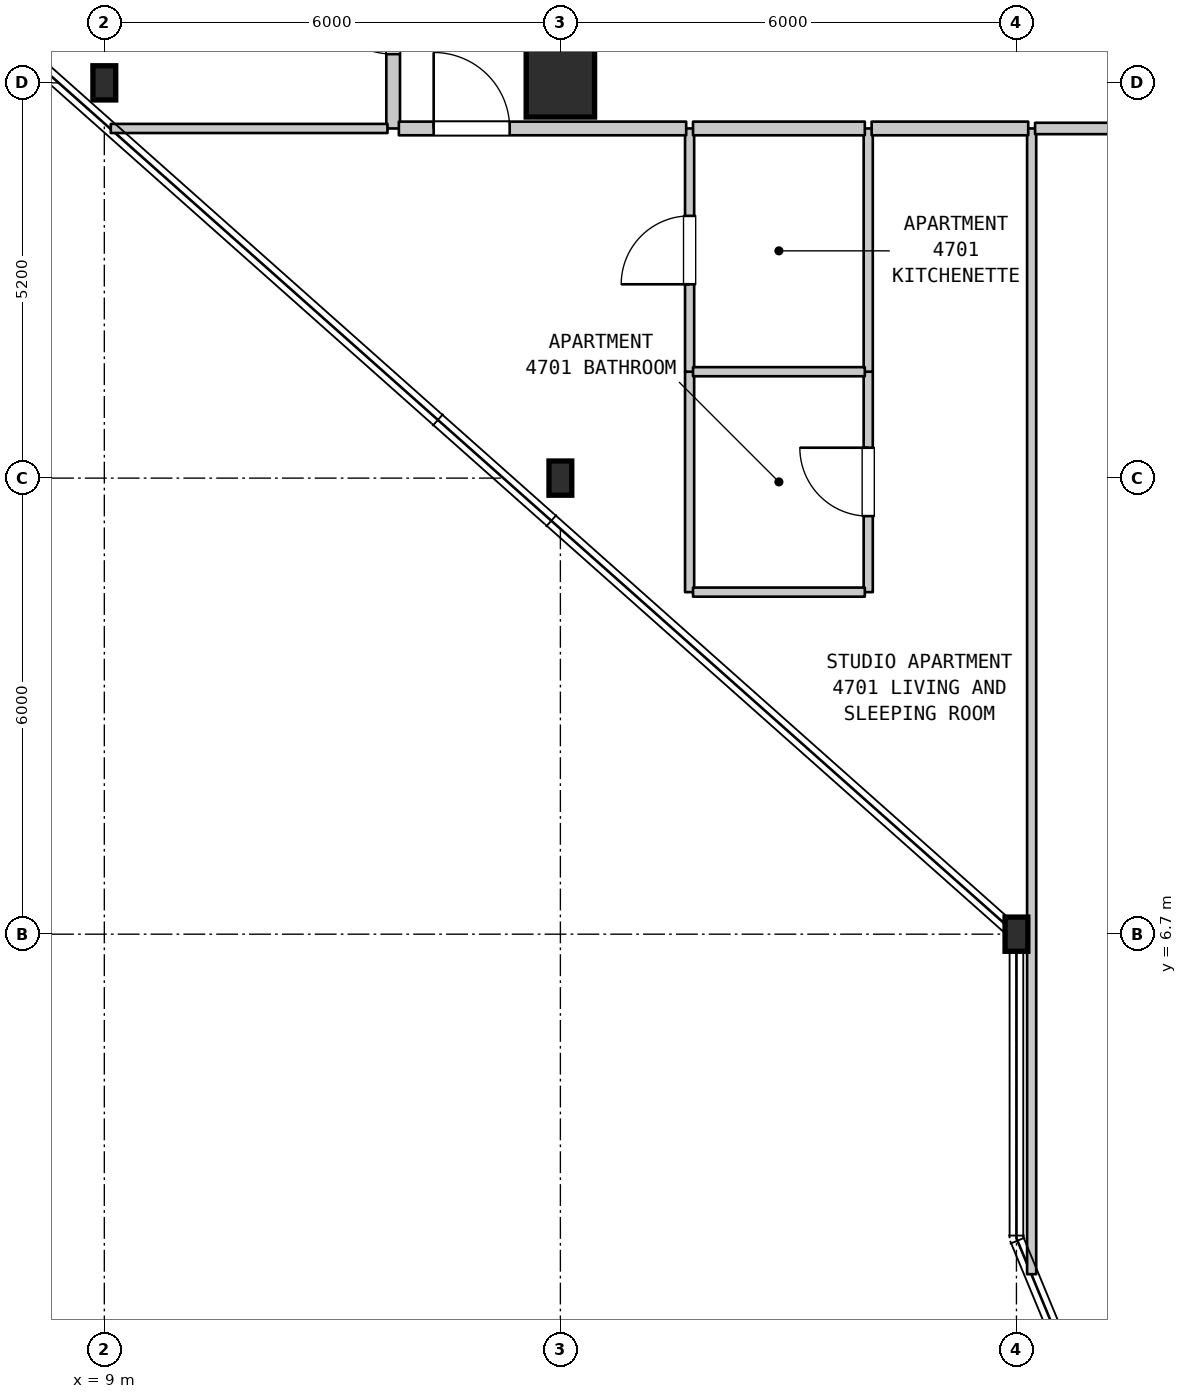
"""IFC4 building model, lengths in metres.
Left out: names, types, materials, properties, quantities, classifications, styles, units other than length and angle.
Written with IfcOpenShell. Run it as: python <this file> out.ifc"""

import sys

from ifc_helpers import new_model, si_unit, direction, frame, frame_2d, origin, origin_2d, place, context, subcontext, project, spatial, rectangle, i_section, extrude, element, fill, save


model = new_model("IFC4")
c1 = context("Model", 3, precision=1e-05, world=origin(), true_north=direction((0.0, 1.0)))
c2 = subcontext(c1, "Body", "Model", "MODEL_VIEW")
j1 = project(units=[si_unit("LENGTHUNIT", "METRE"), si_unit("PLANEANGLEUNIT", "RADIAN")], contexts=[c1])
p1 = place(None, origin())
s1 = spatial("IfcSite", under=j1, at=p1, CompositionType="ELEMENT")
p2 = place(p1, origin())
s2 = spatial("IfcBuilding", under=s1, at=p2, CompositionType="ELEMENT")
p3 = place(p2, frame((0.0, 0.0, 192.1)))
s3 = spatial("IfcBuildingStorey", under=s2, at=p3, CompositionType="ELEMENT", Elevation=192.1)
for number, where, z_axis, x_axis in (
    (1, (9.0, 17.9, 0.0), (0.0, 0.0, 1.0), (1.0, 0.0, 0.0)),
    (2, (15.0, 12.7, 0.0), (0.0, 0.0, 1.0), (1.0, 0.0, 0.0)),
):
    element("IfcColumn", number, at=place(p3, frame(where, z_axis=z_axis, x_axis=x_axis)), inside=s3, PredefinedType="COLUMN", context=c2, shape_type="SweptSolid", body=[
        extrude(i_section(OverallWidth=0.3, OverallDepth=0.45, WebThickness=0.014, FlangeThickness=0.026, FilletRadius=0.027, at=origin_2d()), origin(), (0.0, 0.0, 1.0), 3.7),
    ])
p4 = place(p3, frame((15.0, 17.9, 0.0), z_axis=(0.0, 0.0, 1.0), x_axis=(1.0, 0.0, 0.0)))
e3 = element("IfcColumn", 3, at=p4, inside=s3, PredefinedType="COLUMN", context=c2, shape_type="SweptSolid", body=[
    extrude(rectangle(XDim=0.9, YDim=0.9, at=origin_2d()), origin(), (0.0, 0.0, 1.0), 3.7),
])
p5 = place(p3, frame((21.0, 6.7, 0.0), z_axis=(0.0, 0.0, 1.0), x_axis=(1.0, 0.0, 0.0)))
e4 = element("IfcColumn", 4, at=p5, inside=s3, PredefinedType="COLUMN", context=c2, shape_type="SweptSolid", body=[
    extrude(i_section(OverallWidth=0.3, OverallDepth=0.45, WebThickness=0.014, FlangeThickness=0.026, FilletRadius=0.027, at=origin_2d()), origin(), (0.0, 0.0, 1.0), 3.7),
])
p6 = place(p3, frame((12.8, 17.3, 0.0), z_axis=(0.0, 0.0, 1.0), x_axis=(0.0, 1.0, 0.0)))
e5 = element("IfcWall", 5, at=p6, inside=s3, PredefinedType="STANDARD", context=c2, shape_type="SweptSolid", body=[
    extrude(rectangle(XDim=3.1, YDim=0.18, at=frame_2d((1.55, 0.0))), origin(), (0.0, 0.0, 1.0), 3.39),
])
p7 = place(p6, frame((0.978, 0.0, 0.0)))
e6 = element("IfcOpeningElement", 6, at=p7, cuts=e5, PredefinedType="OPENING", context=c2, shape_type="SweptSolid", body=[
    extrude(rectangle(XDim=1.0, YDim=2.15, at=frame_2d((0.5, 1.075))), frame((0.0, 0.1, 0.0), z_axis=(0.0, -1.0, 0.0), x_axis=(1.0, 0.0, 0.0)), (0.0, 0.0, 1.0), 0.2),
])
p8 = place(p3, frame((16.7, 11.2, 0.0), z_axis=(0.0, 0.0, 1.0), x_axis=(0.0, 1.0, 0.0)))
e7 = element("IfcWall", 7, at=p8, inside=s3, PredefinedType="PARTITIONING", context=c2, shape_type="SweptSolid", body=[
    extrude(rectangle(XDim=2.9, YDim=0.12, at=frame_2d((1.45, 0.0))), origin(), (0.0, 0.0, 1.0), 3.39),
])
p9 = place(p3, frame((16.7, 14.1, 0.0), z_axis=(0.0, 0.0, 1.0), x_axis=(0.0, 1.0, 0.0)))
e8 = element("IfcWall", 8, at=p9, inside=s3, PredefinedType="PARTITIONING", context=c2, shape_type="SweptSolid", body=[
    extrude(rectangle(XDim=3.2, YDim=0.12, at=frame_2d((1.6, 0.0))), origin(), (0.0, 0.0, 1.0), 3.39),
])
p10 = place(p9, frame((1.15, 0.0, 0.0)))
e9 = element("IfcOpeningElement", 9, at=p10, cuts=e8, PredefinedType="OPENING", context=c2, shape_type="SweptSolid", body=[
    extrude(rectangle(XDim=0.9, YDim=2.15, at=frame_2d((0.45, 1.075))), frame((0.0, 0.07, 0.0), z_axis=(0.0, -1.0, 0.0), x_axis=(1.0, 0.0, 0.0)), (0.0, 0.0, 1.0), 0.14),
])
p11 = place(p3, frame((19.05, 11.2, 0.0), z_axis=(0.0, 0.0, 1.0), x_axis=(0.0, 1.0, 0.0)))
e10 = element("IfcWall", 10, at=p11, inside=s3, PredefinedType="PARTITIONING", context=c2, shape_type="SweptSolid", body=[
    extrude(rectangle(XDim=2.9, YDim=0.12, at=frame_2d((1.45, 0.0))), origin(), (0.0, 0.0, 1.0), 3.39),
])
p12 = place(p11, frame((1.0, 0.0, 0.0)))
e11 = element("IfcOpeningElement", 11, at=p12, cuts=e10, PredefinedType="OPENING", context=c2, shape_type="SweptSolid", body=[
    extrude(rectangle(XDim=0.9, YDim=2.1, at=frame_2d((0.45, 1.05))), frame((0.0, 0.07, 0.0), z_axis=(0.0, -1.0, 0.0), x_axis=(1.0, 0.0, 0.0)), (0.0, 0.0, 1.0), 0.14),
])
p13 = place(p3, frame((19.05, 14.1, 0.0), z_axis=(0.0, 0.0, 1.0), x_axis=(0.0, 1.0, 0.0)))
e12 = element("IfcWall", 12, at=p13, inside=s3, PredefinedType="PARTITIONING", context=c2, shape_type="SweptSolid", body=[
    extrude(rectangle(XDim=3.2, YDim=0.12, at=frame_2d((1.6, 0.0))), origin(), (0.0, 0.0, 1.0), 3.39),
])
p14 = place(p3, frame((21.2, 2.227, 0.0), z_axis=(0.0, 0.0, 1.0), x_axis=(0.0, 1.0, 0.0)))
e13 = element("IfcWall", 13, at=p14, inside=s3, PredefinedType="PARTITIONING", context=c2, shape_type="SweptSolid", body=[
    extrude(rectangle(XDim=15.073, YDim=0.12, at=frame_2d((7.537, 0.0))), origin(), (0.0, 0.0, 1.0), 3.39),
])
for number, where, z_axis, x_axis in (
    (14, (16.745, 11.2, 0.0), (0.0, 0.0, 1.0), (1.0, 0.0, 0.0)),
    (15, (16.745, 14.1, 0.0), (0.0, 0.0, 1.0), (1.0, 0.0, 0.0)),
):
    element("IfcWall", number, at=place(p3, frame(where, z_axis=z_axis, x_axis=x_axis)), inside=s3, PredefinedType="PARTITIONING", context=c2, shape_type="SweptSolid", body=[
        extrude(rectangle(XDim=2.26, YDim=0.12, at=frame_2d((1.13, 0.0))), origin(), (0.0, 0.0, 1.0), 3.39),
    ])
p15 = place(p3, frame((9.085, 17.3, 0.0), z_axis=(0.0, 0.0, 1.0), x_axis=(1.0, 0.0, 0.0)))
e16 = element("IfcWall", 16, at=p15, inside=s3, PredefinedType="PARTITIONING", context=c2, shape_type="SweptSolid", body=[
    extrude(rectangle(XDim=3.64, YDim=0.12, at=frame_2d((1.82, 0.0))), origin(), (0.0, 0.0, 1.0), 3.39),
])
p16 = place(p3, frame((12.875, 17.3, 0.0), z_axis=(0.0, 0.0, 1.0), x_axis=(1.0, 0.0, 0.0)))
e17 = element("IfcWall", 17, at=p16, inside=s3, PredefinedType="STANDARD", context=c2, shape_type="SweptSolid", body=[
    extrude(rectangle(XDim=3.78, YDim=0.18, at=frame_2d((1.89, 0.0))), origin(), (0.0, 0.0, 1.0), 3.39),
])
p17 = place(p16, frame((0.458, 0.0, 0.0)))
e18 = element("IfcOpeningElement", 18, at=p17, cuts=e17, PredefinedType="OPENING", context=c2, shape_type="SweptSolid", body=[
    extrude(rectangle(XDim=1.0, YDim=2.15, at=frame_2d((0.5, 1.075))), frame((0.0, 0.1, 0.0), z_axis=(0.0, -1.0, 0.0), x_axis=(1.0, 0.0, 0.0)), (0.0, 0.0, 1.0), 0.2),
])
p18 = place(p3, frame((16.745, 17.3, 0.0), z_axis=(0.0, 0.0, 1.0), x_axis=(1.0, 0.0, 0.0)))
e19 = element("IfcWall", 19, at=p18, inside=s3, PredefinedType="STANDARD", context=c2, shape_type="SweptSolid", body=[
    extrude(rectangle(XDim=2.26, YDim=0.18, at=frame_2d((1.13, 0.0))), origin(), (0.0, 0.0, 1.0), 3.39),
])
p19 = place(p3, frame((19.095, 17.3, 0.0), z_axis=(0.0, 0.0, 1.0), x_axis=(1.0, 0.0, 0.0)))
e20 = element("IfcWall", 20, at=p19, inside=s3, PredefinedType="STANDARD", context=c2, shape_type="SweptSolid", body=[
    extrude(rectangle(XDim=2.06, YDim=0.18, at=frame_2d((1.03, 0.0))), origin(), (0.0, 0.0, 1.0), 3.39),
])
p20 = place(p3, frame((21.245, 17.3, 0.0), z_axis=(0.0, 0.0, 1.0), x_axis=(1.0, 0.0, 0.0)))
e21 = element("IfcWall", 21, at=p20, inside=s3, PredefinedType="STANDARD", context=c2, shape_type="SweptSolid", body=[
    extrude(rectangle(XDim=4.91, YDim=0.15, at=frame_2d((2.455, 0.0))), origin(), (0.0, 0.0, 1.0), 3.39),
])
p21 = place(p20, frame((1.884, 0.0, 0.0)))
e22 = element("IfcOpeningElement", 22, at=p21, cuts=e21, PredefinedType="OPENING", context=c2, shape_type="SweptSolid", body=[
    extrude(rectangle(XDim=1.0, YDim=2.15, at=frame_2d((0.5, 1.075))), frame((0.0, 0.085, 0.0), z_axis=(0.0, -1.0, 0.0), x_axis=(1.0, 0.0, 0.0)), (0.0, 0.0, 1.0), 0.17),
])
p22 = place(p7, origin())
e23 = element("IfcDoor", 23, at=p22, inside=s3, OperationType="SINGLE_SWING_RIGHT", PredefinedType="DOOR", context=c2, shape_type="SweptSolid", body=[
    extrude(rectangle(XDim=1.0, YDim=2.15, at=frame_2d((0.5, 1.075))), frame((0.0, 0.025, 0.0), z_axis=(0.0, -1.0, 0.0), x_axis=(1.0, 0.0, 0.0)), (0.0, 0.0, 1.0), 0.05),
])
fill(e6, e23)
p23 = place(p10, origin())
e24 = element("IfcDoor", 24, at=p23, inside=s3, OperationType="SINGLE_SWING_LEFT", PredefinedType="DOOR", context=c2, shape_type="SweptSolid", body=[
    extrude(rectangle(XDim=0.9, YDim=2.15, at=frame_2d((0.45, 1.075))), frame((0.0, 0.025, 0.0), z_axis=(0.0, -1.0, 0.0), x_axis=(1.0, 0.0, 0.0)), (0.0, 0.0, 1.0), 0.05),
])
fill(e9, e24)
p24 = place(p12, origin())
e25 = element("IfcDoor", 25, at=p24, inside=s3, OperationType="SINGLE_SWING_RIGHT", PredefinedType="DOOR", context=c2, shape_type="SweptSolid", body=[
    extrude(rectangle(XDim=0.9, YDim=2.1, at=frame_2d((0.45, 1.05))), frame((0.0, 0.025, 0.0), z_axis=(0.0, -1.0, 0.0), x_axis=(1.0, 0.0, 0.0)), (0.0, 0.0, 1.0), 0.05),
])
fill(e11, e25)
p25 = place(p17, origin())
e26 = element("IfcDoor", 26, at=p25, inside=s3, OperationType="SINGLE_SWING_LEFT", PredefinedType="DOOR", context=c2, shape_type="SweptSolid", body=[
    extrude(rectangle(XDim=1.0, YDim=2.15, at=frame_2d((0.5, 1.075))), frame((0.0, 0.025, 0.0), z_axis=(0.0, -1.0, 0.0), x_axis=(1.0, 0.0, 0.0)), (0.0, 0.0, 1.0), 0.05),
])
fill(e18, e26)
save(model, sys.argv[1])
